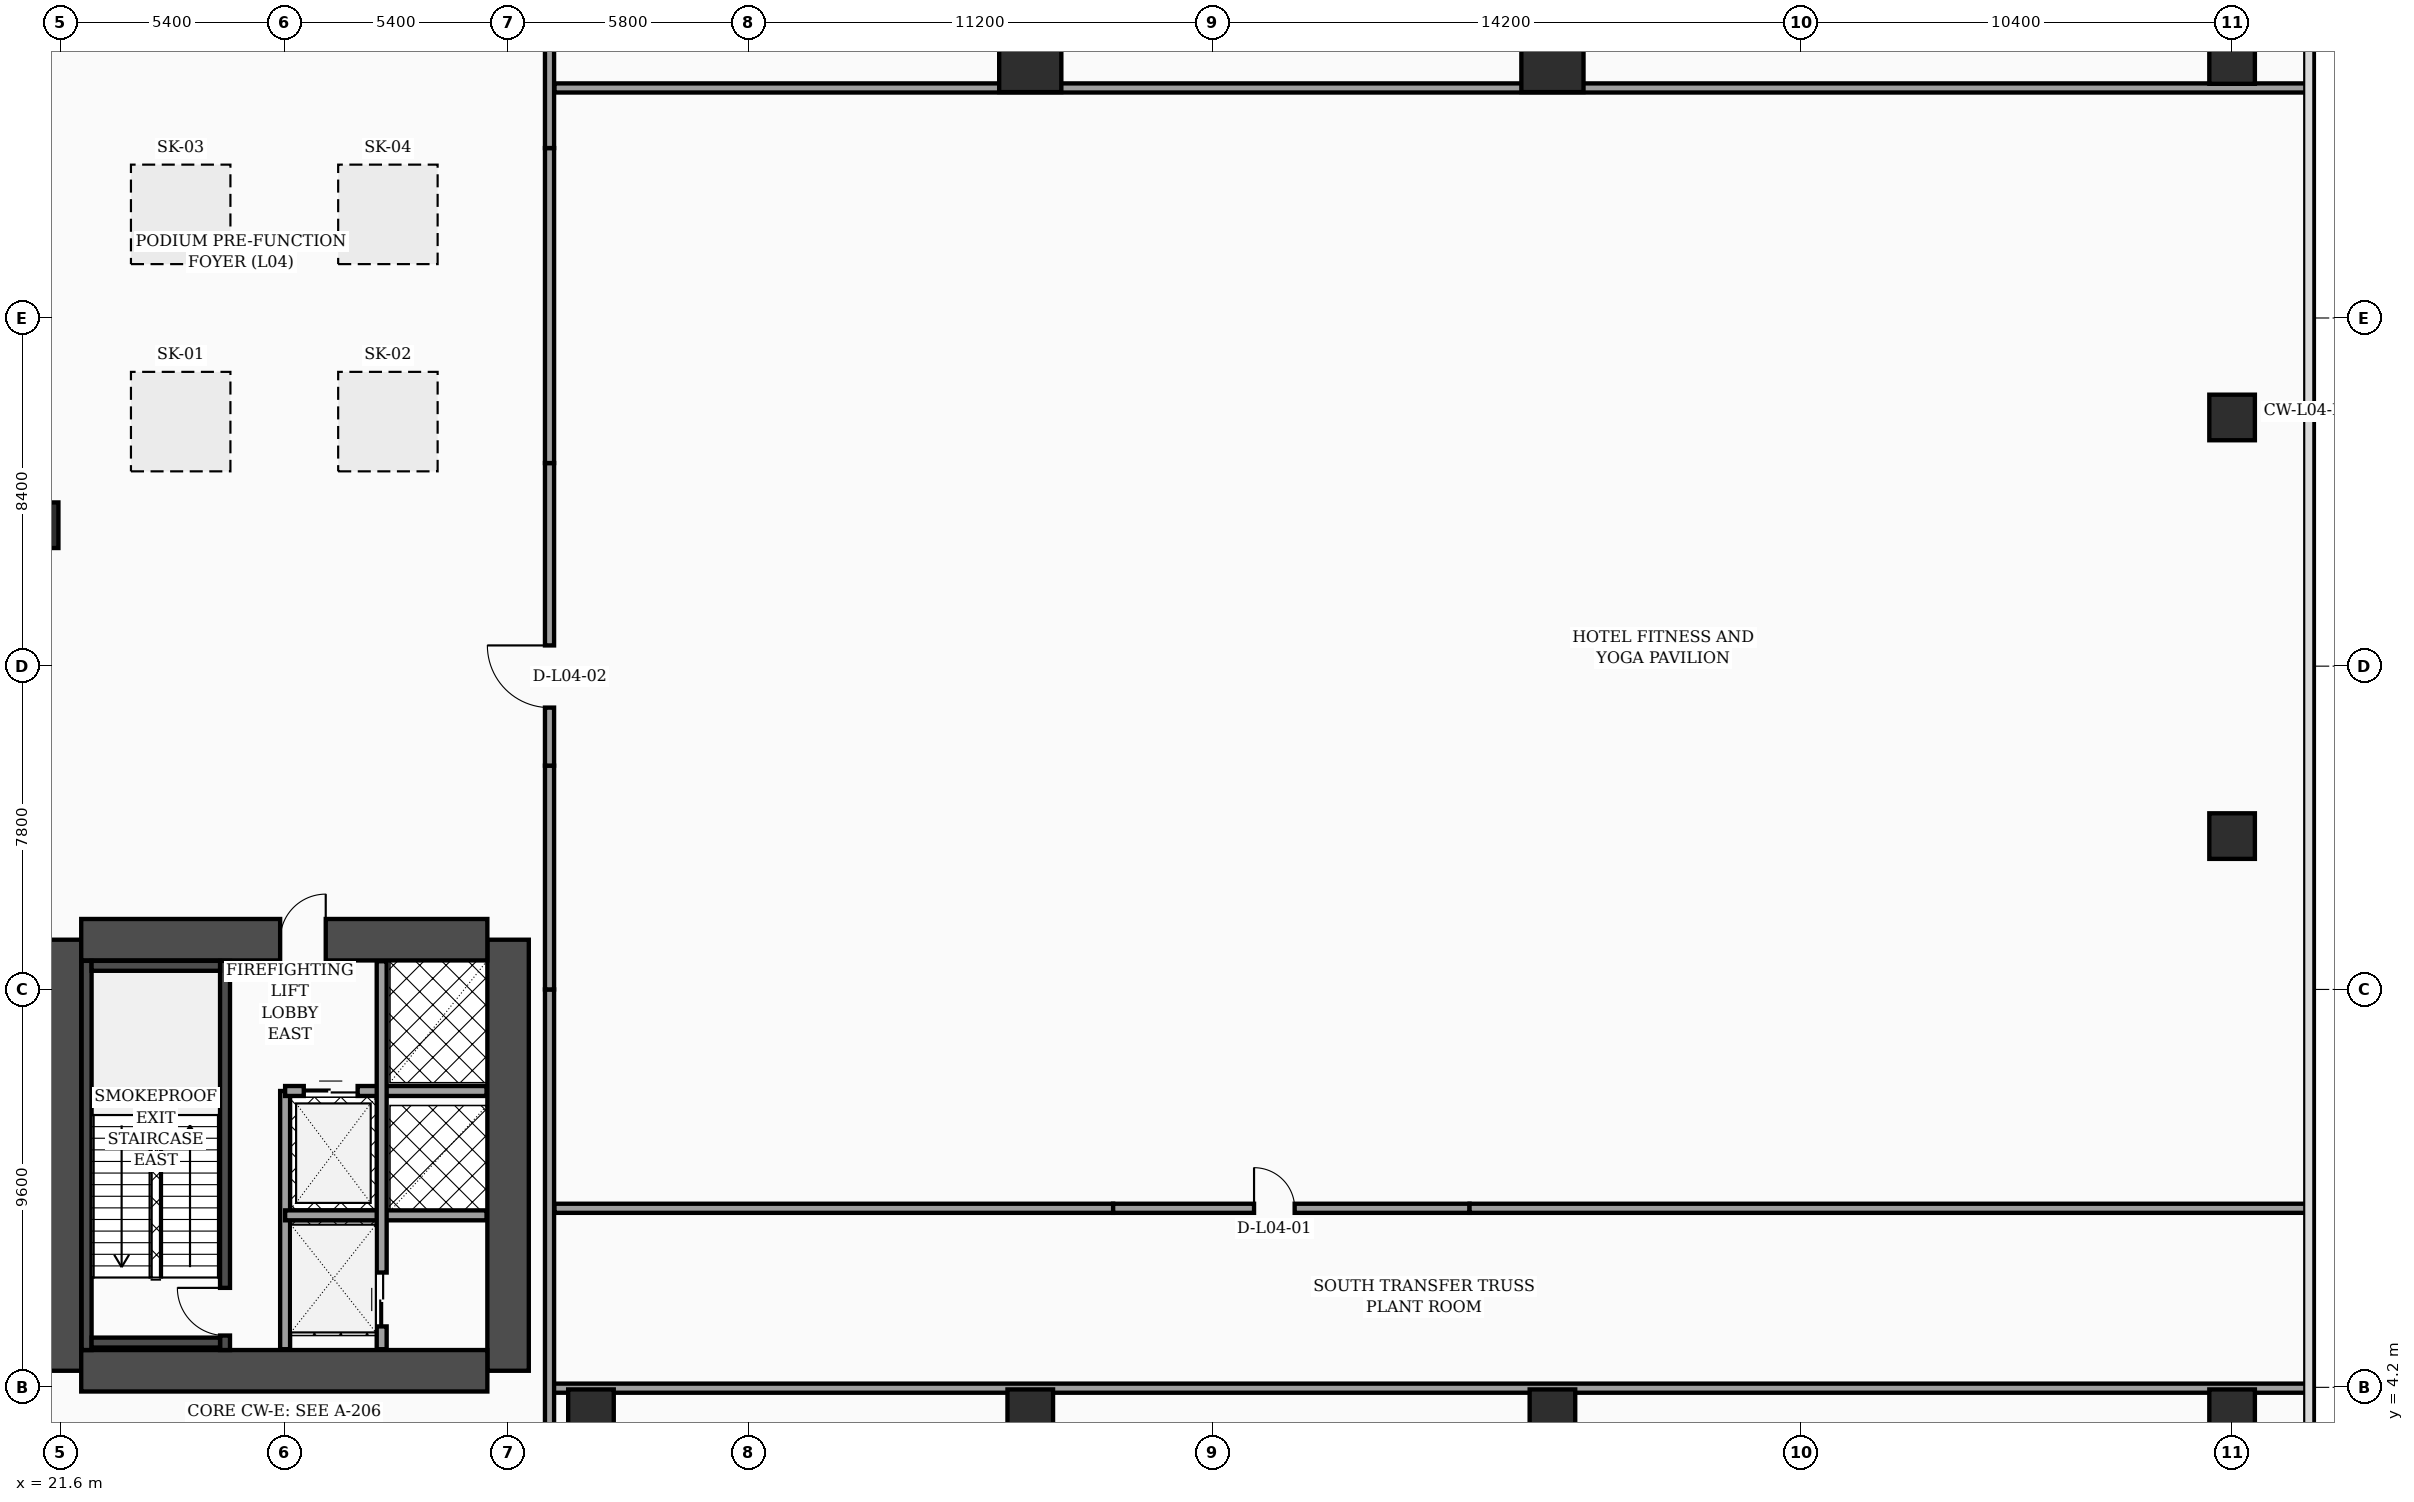
"""IFC4 building model, lengths in metres.
Left out: names, types, materials, properties, quantities, classifications, styles, units other than length and angle.
Written with IfcOpenShell. Run it as: python <this file> out.ifc"""

import sys

from ifc_helpers import new_model, si_unit, direction, frame, frame_2d, origin, origin_2d, place, context, subcontext, project, spatial, rectangle, hollow_rectangle, extrude, element, fill, save


model = new_model("IFC4")
c1 = context("Model", 3, precision=1e-05, world=origin(), true_north=direction((0.0, 1.0)))
c2 = subcontext(c1, "Body", "Model", "MODEL_VIEW")
j1 = project(units=[si_unit("LENGTHUNIT", "METRE"), si_unit("PLANEANGLEUNIT", "RADIAN")], contexts=[c1])
p1 = place(None, origin())
s1 = spatial("IfcSite", under=j1, at=p1, CompositionType="ELEMENT")
p2 = place(p1, origin())
s2 = spatial("IfcBuilding", under=s1, at=p2, CompositionType="ELEMENT")
p3 = place(p2, frame((0.0, 0.0, 22.0)))
s3 = spatial("IfcBuildingStorey", under=s2, at=p3, CompositionType="ELEMENT", Elevation=22.0)
for number, where, z_axis, x_axis in (
    (1, (21.6, 4.6, 0.0), (0.0, 0.0, 1.0), (0.0, 1.0, 0.0)),
    (2, (32.4, 4.6, 0.0), (0.0, 0.0, 1.0), (0.0, 1.0, 0.0)),
):
    element("IfcWall", number, at=place(p3, frame(where, z_axis=z_axis, x_axis=x_axis)), inside=s3, PredefinedType="SHEAR", context=c2, shape_type="SweptSolid", body=[
        extrude(rectangle(XDim=10.4, YDim=1.0, at=frame_2d((5.2, 0.0))), origin(), (0.0, 0.0, 1.0), 4.76),
    ])
p4 = place(p3, frame((22.1, 15.0, 0.0), z_axis=(0.0, 0.0, 1.0), x_axis=(1.0, 0.0, 0.0)))
e3 = element("IfcWall", 3, at=p4, inside=s3, PredefinedType="SHEAR", context=c2, shape_type="SweptSolid", body=[
    extrude(rectangle(XDim=9.8, YDim=1.0, at=frame_2d((4.9, 0.0))), origin(), (0.0, 0.0, 1.0), 4.76),
])
p5 = place(p4, frame((4.8, 0.0, 0.0)))
e4 = element("IfcOpeningElement", 4, at=p5, cuts=e3, PredefinedType="OPENING", context=c2, shape_type="SweptSolid", body=[
    extrude(rectangle(XDim=1.1, YDim=2.2, at=frame_2d((0.55, 1.1))), frame((0.0, 0.51, 0.0), z_axis=(0.0, -1.0, 0.0), x_axis=(1.0, 0.0, 0.0)), (0.0, 0.0, 1.0), 1.02),
])
p6 = place(p3, frame((22.1, 4.6, 0.0), z_axis=(0.0, 0.0, 1.0), x_axis=(1.0, 0.0, 0.0)))
e5 = element("IfcWall", 5, at=p6, inside=s3, PredefinedType="SHEAR", context=c2, shape_type="SweptSolid", body=[
    extrude(rectangle(XDim=9.8, YDim=1.0, at=frame_2d((4.9, 0.0))), origin(), (0.0, 0.0, 1.0), 4.76),
])
p7 = place(p3, frame((22.23, 5.1, 0.0), z_axis=(0.0, 0.0, 1.0), x_axis=(0.0, 1.0, 0.0)))
e6 = element("IfcWall", 6, at=p7, inside=s3, PredefinedType="SOLIDWALL", context=c2, shape_type="SweptSolid", body=[
    extrude(rectangle(XDim=9.39, YDim=0.24, at=frame_2d((4.695, 0.0))), origin(), (0.0, 0.0, 1.0), 4.76),
])
p8 = place(p3, frame((25.57, 5.1, 0.0), z_axis=(0.0, 0.0, 1.0), x_axis=(0.0, 1.0, 0.0)))
e7 = element("IfcWall", 7, at=p8, inside=s3, PredefinedType="SOLIDWALL", context=c2, shape_type="SweptSolid", body=[
    extrude(rectangle(XDim=9.39, YDim=0.24, at=frame_2d((4.695, 0.0))), origin(), (0.0, 0.0, 1.0), 4.76),
])
p9 = place(p8, frame((0.35, 0.0, 0.0)))
e8 = element("IfcOpeningElement", 8, at=p9, cuts=e7, PredefinedType="OPENING", context=c2, shape_type="SweptSolid", body=[
    extrude(rectangle(XDim=1.15, YDim=2.2, at=frame_2d((0.575, 1.1))), frame((0.0, 0.13, 0.0), z_axis=(0.0, -1.0, 0.0), x_axis=(1.0, 0.0, 0.0)), (0.0, 0.0, 1.0), 0.26),
])
for number, where, z_axis, x_axis in (
    (9, (22.35, 5.28, 0.0), (0.0, 0.0, 1.0), (1.0, 0.0, 0.0)),
    (10, (22.35, 14.37, 0.0), (0.0, 0.0, 1.0), (1.0, 0.0, 0.0)),
):
    element("IfcWall", number, at=place(p3, frame(where, z_axis=z_axis, x_axis=x_axis)), inside=s3, PredefinedType="SOLIDWALL", context=c2, shape_type="SweptSolid", body=[
        extrude(rectangle(XDim=3.1, YDim=0.24, at=frame_2d((1.55, 0.0))), origin(), (0.0, 0.0, 1.0), 4.76),
    ])
for number, where, z_axis, x_axis in (
    (11, (21.0, 25.0, 0.0), (0.0, 0.0, 1.0), (1.0, 0.0, 0.0)),
    (12, (34.4, 3.6, 0.0), (0.0, 0.0, 1.0), (1.0, 0.0, 0.0)),
    (13, (45.0, 3.6, 0.0), (0.0, 0.0, 1.0), (1.0, 0.0, 0.0)),
    (14, (57.6, 3.6, 0.0), (0.0, 0.0, 1.0), (1.0, 0.0, 0.0)),
    (15, (74.0, 3.6, 0.0), (0.0, 0.0, 1.0), (1.0, 0.0, 0.0)),
    (16, (74.0, 17.5, 0.0), (0.0, 0.0, 1.0), (1.0, 0.0, 0.0)),
    (17, (74.0, 27.6, 0.0), (0.0, 0.0, 1.0), (1.0, 0.0, 0.0)),
    (18, (74.0, 36.2, 0.0), (0.0, 0.0, 1.0), (1.0, 0.0, 0.0)),
):
    element("IfcColumn", number, at=place(p3, frame(where, z_axis=z_axis, x_axis=x_axis)), inside=s3, PredefinedType="COLUMN", context=c2, shape_type="SweptSolid", body=[
        extrude(hollow_rectangle(XDim=1.1, YDim=1.1, WallThickness=0.045, at=origin_2d()), origin(), (0.0, 0.0, 1.0), 4.76),
    ])
for number, where, z_axis, x_axis in (
    (19, (45.0, 36.2, 0.0), (0.0, 0.0, 1.0), (1.0, 0.0, 0.0)),
    (20, (57.6, 36.2, 0.0), (0.0, 0.0, 1.0), (1.0, 0.0, 0.0)),
):
    element("IfcColumn", number, at=place(p3, frame(where, z_axis=z_axis, x_axis=x_axis)), inside=s3, PredefinedType="COLUMN", context=c2, shape_type="SweptSolid", body=[
        extrude(rectangle(XDim=1.5, YDim=1.5, at=origin_2d()), origin(), (0.0, 0.0, 1.0), 4.76),
    ])
p10 = place(p3, frame((27.02, 5.12, 0.0), z_axis=(0.0, 0.0, 1.0), x_axis=(0.0, 1.0, 0.0)))
e21 = element("IfcWall", 21, at=p10, inside=s3, PredefinedType="SOLIDWALL", context=c2, shape_type="SweptSolid", body=[
    extrude(rectangle(XDim=6.23, YDim=0.24, at=frame_2d((3.115, 0.0))), origin(), (0.0, 0.0, 1.0), 4.76),
])
p11 = place(p3, frame((27.02, 11.35, 0.0), z_axis=(0.0, 0.0, 1.0), x_axis=(1.0, 0.0, 0.0)))
e22 = element("IfcWall", 22, at=p11, inside=s3, PredefinedType="SOLIDWALL", context=c2, shape_type="SweptSolid", body=[
    extrude(rectangle(XDim=4.86, YDim=0.24, at=frame_2d((2.43, 0.0))), origin(), (0.0, 0.0, 1.0), 4.76),
])
p12 = place(p11, frame((0.45, 0.0, 0.0)))
e23 = element("IfcOpeningElement", 23, at=p12, cuts=e22, PredefinedType="OPENING", context=c2, shape_type="SweptSolid", body=[
    extrude(rectangle(XDim=1.3, YDim=2.35, at=frame_2d((0.65, 1.175))), frame((0.0, 0.13, 0.0), z_axis=(0.0, -1.0, 0.0), x_axis=(1.0, 0.0, 0.0)), (0.0, 0.0, 1.0), 0.26),
])
p13 = place(p3, frame((27.02, 8.35, 0.0), z_axis=(0.0, 0.0, 1.0), x_axis=(1.0, 0.0, 0.0)))
e24 = element("IfcWall", 24, at=p13, inside=s3, PredefinedType="SOLIDWALL", context=c2, shape_type="SweptSolid", body=[
    extrude(rectangle(XDim=4.86, YDim=0.24, at=frame_2d((2.43, 0.0))), origin(), (0.0, 0.0, 1.0), 4.76),
])
p14 = place(p3, frame((29.35, 5.12, 0.0), z_axis=(0.0, 0.0, 1.0), x_axis=(0.0, 1.0, 0.0)))
e25 = element("IfcWall", 25, at=p14, inside=s3, PredefinedType="SOLIDWALL", context=c2, shape_type="SweptSolid", body=[
    extrude(rectangle(XDim=9.36, YDim=0.24, at=frame_2d((4.68, 0.0))), origin(), (0.0, 0.0, 1.0), 4.76),
])
p15 = place(p14, frame((0.55, 0.0, 0.0)))
e26 = element("IfcOpeningElement", 26, at=p15, cuts=e25, PredefinedType="OPENING", context=c2, shape_type="SweptSolid", body=[
    extrude(rectangle(XDim=1.3, YDim=2.35, at=frame_2d((0.65, 1.175))), frame((0.0, 0.13, 0.0), z_axis=(0.0, -1.0, 0.0), x_axis=(1.0, 0.0, 0.0)), (0.0, 0.0, 1.0), 0.26),
])
p16 = place(p3, frame((33.4, 4.18, 0.0), z_axis=(0.0, 0.0, 1.0), x_axis=(1.0, 0.0, 0.0)))
e27 = element("IfcWall", 27, at=p16, inside=s3, PredefinedType="SOLIDWALL", context=c2, shape_type="SweptSolid", body=[
    extrude(rectangle(XDim=42.48, YDim=0.22, at=frame_2d((21.24, 0.0))), origin(), (0.0, 0.0, 1.0), 1.89),
])
p17 = place(p3, frame((33.4, 0.06, 0.0), z_axis=(0.0, 0.0, 1.0), x_axis=(0.0, 1.0, 0.0)))
e28 = element("IfcWall", 28, at=p17, inside=s3, PredefinedType="SOLIDWALL", context=c2, shape_type="SweptSolid", body=[
    extrude(rectangle(XDim=13.74, YDim=0.22, at=frame_2d((6.87, 0.0))), origin(), (0.0, 0.0, 1.0), 3.94),
])
p18 = place(p3, frame((33.4, 13.8, 0.0), z_axis=(0.0, 0.0, 1.0), x_axis=(0.0, 1.0, 0.0)))
e29 = element("IfcWall", 29, at=p18, inside=s3, PredefinedType="SOLIDWALL", context=c2, shape_type="SweptSolid", body=[
    extrude(rectangle(XDim=5.4, YDim=0.22, at=frame_2d((2.7, 0.0))), origin(), (0.0, 0.0, 1.0), 1.89),
])
p19 = place(p3, frame((33.4, 19.2, 0.0), z_axis=(0.0, 0.0, 1.0), x_axis=(0.0, 1.0, 0.0)))
e30 = element("IfcWall", 30, at=p19, inside=s3, PredefinedType="SOLIDWALL", context=c2, shape_type="SweptSolid", body=[
    extrude(rectangle(XDim=7.3, YDim=0.22, at=frame_2d((3.65, 0.0))), origin(), (0.0, 0.0, 1.0), 4.76),
])
p20 = place(p19, frame((1.4, 0.0, 0.0)))
e31 = element("IfcOpeningElement", 31, at=p20, cuts=e30, PredefinedType="OPENING", context=c2, shape_type="SweptSolid", body=[
    extrude(rectangle(XDim=1.5, YDim=2.22, at=frame_2d((0.75, 1.11))), frame((0.0, 0.12, 0.0), z_axis=(0.0, -1.0, 0.0), x_axis=(1.0, 0.0, 0.0)), (0.0, 0.0, 1.0), 0.24),
])
p21 = place(p3, frame((33.4, 26.5, 0.0), z_axis=(0.0, 0.0, 1.0), x_axis=(0.0, 1.0, 0.0)))
e32 = element("IfcWall", 32, at=p21, inside=s3, PredefinedType="SOLIDWALL", context=c2, shape_type="SweptSolid", body=[
    extrude(rectangle(XDim=7.6, YDim=0.22, at=frame_2d((3.8, 0.0))), origin(), (0.0, 0.0, 1.0), 1.89),
])
p22 = place(p3, frame((33.4, 34.1, 0.0), z_axis=(0.0, 0.0, 1.0), x_axis=(0.0, 1.0, 0.0)))
e33 = element("IfcWall", 33, at=p22, inside=s3, PredefinedType="SOLIDWALL", context=c2, shape_type="SweptSolid", body=[
    extrude(rectangle(XDim=21.34, YDim=0.22, at=frame_2d((10.67, 0.0))), origin(), (0.0, 0.0, 1.0), 3.94),
])
p23 = place(p22, frame((4.2, 0.0, 0.0)))
e34 = element("IfcOpeningElement", 34, at=p23, cuts=e33, PredefinedType="OPENING", context=c2, shape_type="SweptSolid", body=[
    extrude(rectangle(XDim=1.6, YDim=2.35, at=frame_2d((0.8, 1.175))), frame((0.0, 0.12, 0.0), z_axis=(0.0, -1.0, 0.0), x_axis=(1.0, 0.0, 0.0)), (0.0, 0.0, 1.0), 0.24),
])
p24 = place(p3, frame((33.52, 8.52, 0.0), z_axis=(0.0, 0.0, 1.0), x_axis=(1.0, 0.0, 0.0)))
e35 = element("IfcWall", 35, at=p24, inside=s3, PredefinedType="SOLIDWALL", context=c2, shape_type="SweptSolid", body=[
    extrude(rectangle(XDim=13.48, YDim=0.22, at=frame_2d((6.74, 0.0))), origin(), (0.0, 0.0, 1.0), 1.89),
])
p25 = place(p3, frame((47.0, 8.52, 0.0), z_axis=(0.0, 0.0, 1.0), x_axis=(1.0, 0.0, 0.0)))
e36 = element("IfcWall", 36, at=p25, inside=s3, PredefinedType="SOLIDWALL", context=c2, shape_type="SweptSolid", body=[
    extrude(rectangle(XDim=8.6, YDim=0.22, at=frame_2d((4.3, 0.0))), origin(), (0.0, 0.0, 1.0), 4.76),
])
p26 = place(p25, frame((3.4, 0.0, 0.0)))
e37 = element("IfcOpeningElement", 37, at=p26, cuts=e36, PredefinedType="OPENING", context=c2, shape_type="SweptSolid", body=[
    extrude(rectangle(XDim=0.98, YDim=2.15, at=frame_2d((0.49, 1.075))), frame((0.0, 0.12, 0.0), z_axis=(0.0, -1.0, 0.0), x_axis=(1.0, 0.0, 0.0)), (0.0, 0.0, 1.0), 0.24),
])
p27 = place(p3, frame((55.6, 8.52, 0.0), z_axis=(0.0, 0.0, 1.0), x_axis=(1.0, 0.0, 0.0)))
e38 = element("IfcWall", 38, at=p27, inside=s3, PredefinedType="SOLIDWALL", context=c2, shape_type="SweptSolid", body=[
    extrude(rectangle(XDim=20.28, YDim=0.22, at=frame_2d((10.14, 0.0))), origin(), (0.0, 0.0, 1.0), 1.89),
])
p28 = place(p3, frame((33.52, 35.55, 0.0), z_axis=(0.0, 0.0, 1.0), x_axis=(1.0, 0.0, 0.0)))
e39 = element("IfcWall", 39, at=p28, inside=s3, PredefinedType="SOLIDWALL", context=c2, shape_type="SweptSolid", body=[
    extrude(rectangle(XDim=42.36, YDim=0.22, at=frame_2d((21.18, 0.0))), origin(), (0.0, 0.0, 1.0), 1.89),
])
p29 = place(p3, frame((0.0, 0.0, -0.45)))
p30 = place(p29, frame((24.5, 27.5, 0.0)))
p31 = place(p30, frame((0.0, 0.0, 0.4)))
e40 = element("IfcWindow", 40, at=p31, inside=s3, PartitioningType="SINGLE_PANEL", PredefinedType="SKYLIGHT", context=c2, shape_type="SweptSolid", body=[
    extrude(rectangle(XDim=2.4, YDim=2.4, at=origin_2d()), origin(), (0.0, 0.0, 1.0), 0.05),
])
p32 = place(p29, frame((29.5, 27.5, 0.0)))
p33 = place(p32, frame((0.0, 0.0, 0.4)))
e41 = element("IfcWindow", 41, at=p33, inside=s3, PartitioningType="SINGLE_PANEL", PredefinedType="SKYLIGHT", context=c2, shape_type="SweptSolid", body=[
    extrude(rectangle(XDim=2.4, YDim=2.4, at=origin_2d()), origin(), (0.0, 0.0, 1.0), 0.05),
])
p34 = place(p29, frame((24.5, 32.5, 0.0)))
p35 = place(p34, frame((0.0, 0.0, 0.4)))
e42 = element("IfcWindow", 42, at=p35, inside=s3, PartitioningType="SINGLE_PANEL", PredefinedType="SKYLIGHT", context=c2, shape_type="SweptSolid", body=[
    extrude(rectangle(XDim=2.4, YDim=2.4, at=origin_2d()), origin(), (0.0, 0.0, 1.0), 0.05),
])
p36 = place(p29, frame((29.5, 32.5, 0.0)))
p37 = place(p36, frame((0.0, 0.0, 0.4)))
e43 = element("IfcWindow", 43, at=p37, inside=s3, PartitioningType="SINGLE_PANEL", PredefinedType="SKYLIGHT", context=c2, shape_type="SweptSolid", body=[
    extrude(rectangle(XDim=2.4, YDim=2.4, at=origin_2d()), origin(), (0.0, 0.0, 1.0), 0.05),
])
p38 = place(p12, origin())
e44 = element("IfcDoor", 44, at=p38, inside=s3, OperationType="DOUBLE_DOOR_SLIDING", PredefinedType="DOOR", context=c2, shape_type="SweptSolid", body=[
    extrude(rectangle(XDim=1.3, YDim=2.35, at=frame_2d((0.65, 1.175))), frame((0.0, 0.025, 0.0), z_axis=(0.0, -1.0, 0.0), x_axis=(1.0, 0.0, 0.0)), (0.0, 0.0, 1.0), 0.05),
])
fill(e23, e44)
p39 = place(p15, origin())
e45 = element("IfcDoor", 45, at=p39, inside=s3, OperationType="DOUBLE_DOOR_SLIDING", PredefinedType="DOOR", context=c2, shape_type="SweptSolid", body=[
    extrude(rectangle(XDim=1.3, YDim=2.35, at=frame_2d((0.65, 1.175))), frame((0.0, 0.025, 0.0), z_axis=(0.0, -1.0, 0.0), x_axis=(1.0, 0.0, 0.0)), (0.0, 0.0, 1.0), 0.05),
])
fill(e26, e45)
p40 = place(p20, origin())
e46 = element("IfcDoor", 46, at=p40, inside=s3, OperationType="SINGLE_SWING_RIGHT", PredefinedType="DOOR", context=c2, shape_type="SweptSolid", body=[
    extrude(rectangle(XDim=1.5, YDim=2.22, at=frame_2d((0.75, 1.11))), frame((0.0, 0.025, 0.0), z_axis=(0.0, -1.0, 0.0), x_axis=(1.0, 0.0, 0.0)), (0.0, 0.0, 1.0), 0.05),
])
fill(e31, e46)
p41 = place(p26, origin())
e47 = element("IfcDoor", 47, at=p41, inside=s3, OperationType="SINGLE_SWING_LEFT", PredefinedType="DOOR", context=c2, shape_type="SweptSolid", body=[
    extrude(rectangle(XDim=0.98, YDim=2.15, at=frame_2d((0.49, 1.075))), frame((0.0, 0.025, 0.0), z_axis=(0.0, -1.0, 0.0), x_axis=(1.0, 0.0, 0.0)), (0.0, 0.0, 1.0), 0.05),
])
fill(e37, e47)
p42 = place(p9, origin())
e48 = element("IfcDoor", 48, at=p42, inside=s3, OperationType="SINGLE_SWING_RIGHT", PredefinedType="DOOR", context=c2, shape_type="SweptSolid", body=[
    extrude(rectangle(XDim=1.15, YDim=2.2, at=frame_2d((0.575, 1.1))), frame((0.0, 0.025, 0.0), z_axis=(0.0, -1.0, 0.0), x_axis=(1.0, 0.0, 0.0)), (0.0, 0.0, 1.0), 0.05),
])
fill(e8, e48)
p43 = place(p5, origin())
e49 = element("IfcDoor", 49, at=p43, inside=s3, OperationType="SINGLE_SWING_RIGHT", PredefinedType="DOOR", context=c2, shape_type="SweptSolid", body=[
    extrude(rectangle(XDim=1.1, YDim=2.2, at=frame_2d((0.55, 1.1))), frame((0.0, 0.025, 0.0), z_axis=(0.0, -1.0, 0.0), x_axis=(1.0, 0.0, 0.0)), (0.0, 0.0, 1.0), 0.05),
])
fill(e4, e49)
save(model, sys.argv[1])
